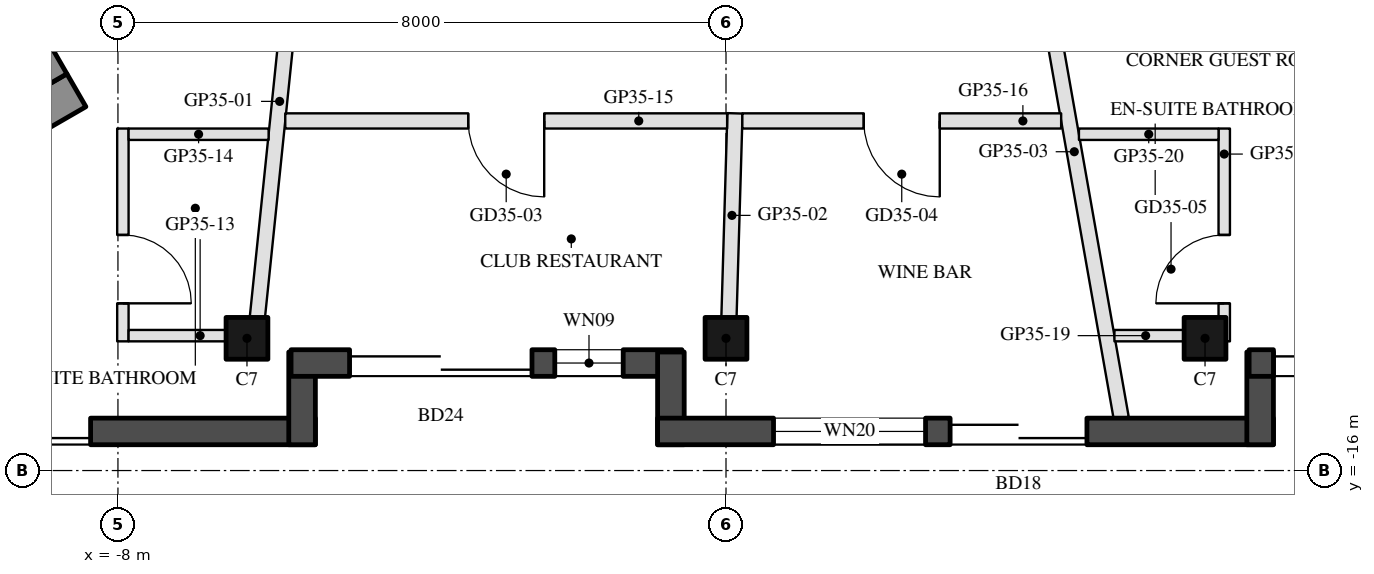
"""IFC4 building model, lengths in metres.
Left out: names, types, materials, properties, quantities, classifications, styles, units other than length and angle.
Written with IfcOpenShell. Run it as: python <this file> out.ifc"""

import sys

from ifc_helpers import new_model, si_unit, direction, frame, frame_2d, origin, origin_2d, place, context, subcontext, project, spatial, rectangle, hollow_rectangle, extrude, boolean, halfspace, element, fill, save


model = new_model("IFC4")
c1 = context("Model", 3, precision=1e-05, world=origin(), true_north=direction((0.0, 1.0)))
c2 = subcontext(c1, "Body", "Model", "MODEL_VIEW")
j1 = project(units=[si_unit("LENGTHUNIT", "METRE"), si_unit("PLANEANGLEUNIT", "RADIAN")], contexts=[c1])
p1 = place(None, origin())
s1 = spatial("IfcSite", under=j1, at=p1, CompositionType="ELEMENT")
p2 = place(p1, origin())
s2 = spatial("IfcBuilding", under=s1, at=p2, CompositionType="ELEMENT")
p3 = place(p2, frame((0.0, 0.0, 324.4)))
s3 = spatial("IfcBuildingStorey", under=s2, at=p3, CompositionType="ELEMENT", Elevation=324.4)
p4 = place(p3, frame((-6.302, -14.26, 0.0), z_axis=(0.0, 0.0, 1.0), x_axis=(-1.0, 0.0, 0.0)))
e1 = element("IfcColumn", 1, at=p4, inside=s3, PredefinedType="COLUMN", context=c2, shape_type="SweptSolid", body=[
    boolean("DIFFERENCE", boolean("DIFFERENCE", extrude(hollow_rectangle(XDim=0.55, YDim=0.55, WallThickness=0.025, at=origin_2d()), origin(), (0.0, 0.0, 1.0), 3.7), halfspace(frame((0.0, 0.0, 0.034), z_axis=(0.0, 0.0, 1.0), x_axis=(1.0, 0.0, 0.0)), True)), halfspace(frame((0.0, 0.0, 3.666), z_axis=(0.0, 0.0, 1.0), x_axis=(1.0, 0.0, 0.0)), False)),
])
p5 = place(p3, frame((0.0, -14.26, 0.0), z_axis=(0.0, 0.0, 1.0), x_axis=(-1.0, 0.0, 0.0)))
e2 = element("IfcColumn", 2, at=p5, inside=s3, PredefinedType="COLUMN", context=c2, shape_type="SweptSolid", body=[
    boolean("DIFFERENCE", boolean("DIFFERENCE", extrude(hollow_rectangle(XDim=0.55, YDim=0.55, WallThickness=0.025, at=origin_2d()), origin(), (0.0, 0.0, 1.0), 3.7), halfspace(frame((0.0, 0.0, 0.031), z_axis=(0.0, 0.0, 1.0), x_axis=(1.0, 0.0, 0.0)), True)), halfspace(frame((0.0, 0.0, 3.669), z_axis=(0.0, 0.0, 1.0), x_axis=(1.0, 0.0, 0.0)), False)),
])
p6 = place(p3, frame((6.302, -14.26, 0.0), z_axis=(0.0, 0.0, 1.0), x_axis=(-1.0, 0.0, 0.0)))
e3 = element("IfcColumn", 3, at=p6, inside=s3, PredefinedType="COLUMN", context=c2, shape_type="SweptSolid", body=[
    boolean("DIFFERENCE", boolean("DIFFERENCE", extrude(hollow_rectangle(XDim=0.55, YDim=0.55, WallThickness=0.025, at=origin_2d()), origin(), (0.0, 0.0, 1.0), 3.7), halfspace(frame((0.0, 0.0, 0.034), z_axis=(0.0, 0.0, 1.0), x_axis=(1.0, 0.0, 0.0)), True)), halfspace(frame((0.0, 0.0, 3.666), z_axis=(0.0, 0.0, 1.0), x_axis=(1.0, 0.0, 0.0)), False)),
])
p7 = place(p3, frame((-15.011, -15.485, 0.0), z_axis=(0.0, 0.0, 1.0), x_axis=(1.0, 0.0, 0.0)))
e4 = element("IfcWall", 4, at=p7, inside=s3, PredefinedType="SOLIDWALL", context=c2, shape_type="SweptSolid", body=[
    extrude(rectangle(XDim=9.608, YDim=0.35, at=frame_2d((4.804, 0.0))), origin(), (0.0, 0.0, 1.0), 3.55),
])
p8 = place(p7, frame((0.38, 0.0, 0.3)))
e5 = element("IfcOpeningElement", 5, at=p8, cuts=e4, PredefinedType="OPENING", context=c2, shape_type="SweptSolid", body=[
    extrude(rectangle(XDim=1.4, YDim=2.65, at=frame_2d((0.7, 1.325))), frame((0.0, 0.185, 0.0), z_axis=(0.0, -1.0, 0.0), x_axis=(1.0, 0.0, 0.0)), (0.0, 0.0, 1.0), 0.37),
])
p9 = place(p7, frame((4.251, 0.0, 0.0)))
e6 = element("IfcOpeningElement", 6, at=p9, cuts=e4, PredefinedType="OPENING", context=c2, shape_type="SweptSolid", body=[
    extrude(rectangle(XDim=2.4, YDim=2.4, at=frame_2d((1.2, 1.2))), frame((0.0, 0.185, 0.0), z_axis=(0.0, -1.0, 0.0), x_axis=(1.0, 0.0, 0.0)), (0.0, 0.0, 1.0), 0.37),
])
p10 = place(p7, frame((3.031, 0.0, 0.3)))
e7 = element("IfcOpeningElement", 7, at=p10, cuts=e4, PredefinedType="OPENING", context=c2, shape_type="SweptSolid", body=[
    extrude(rectangle(XDim=0.9, YDim=2.65, at=frame_2d((0.45, 1.325))), frame((0.0, 0.185, 0.0), z_axis=(0.0, -1.0, 0.0), x_axis=(1.0, 0.0, 0.0)), (0.0, 0.0, 1.0), 0.37),
])
p11 = place(p3, frame((-5.577, -15.66, 0.0), z_axis=(0.0, 0.0, 1.0), x_axis=(0.0, 1.0, 0.0)))
e8 = element("IfcWall", 8, at=p11, inside=s3, PredefinedType="SOLIDWALL", context=c2, shape_type="SweptSolid", body=[
    extrude(rectangle(XDim=1.22, YDim=0.35, at=frame_2d((0.61, 0.0))), origin(), (0.0, 0.0, 1.0), 3.55),
])
p12 = place(p3, frame((-5.722, -14.585, 0.0), z_axis=(0.0, 0.0, 1.0), x_axis=(1.0, 0.0, 0.0)))
e9 = element("IfcWall", 9, at=p12, inside=s3, PredefinedType="SOLIDWALL", context=c2, shape_type="SweptSolid", body=[
    extrude(rectangle(XDim=5.142, YDim=0.35, at=frame_2d((2.571, 0.0))), origin(), (0.0, 0.0, 1.0), 3.55),
])
p13 = place(p12, frame((0.77, 0.0, 0.0)))
e10 = element("IfcOpeningElement", 10, at=p13, cuts=e9, PredefinedType="OPENING", context=c2, shape_type="SweptSolid", body=[
    extrude(rectangle(XDim=2.4, YDim=2.4, at=frame_2d((1.2, 1.2))), frame((0.0, 0.185, 0.0), z_axis=(0.0, -1.0, 0.0), x_axis=(1.0, 0.0, 0.0)), (0.0, 0.0, 1.0), 0.37),
])
p14 = place(p12, frame((3.47, 0.0, 0.3)))
e11 = element("IfcOpeningElement", 11, at=p14, cuts=e9, PredefinedType="OPENING", context=c2, shape_type="SweptSolid", body=[
    extrude(rectangle(XDim=0.9, YDim=2.65, at=frame_2d((0.45, 1.325))), frame((0.0, 0.185, 0.0), z_axis=(0.0, -1.0, 0.0), x_axis=(1.0, 0.0, 0.0)), (0.0, 0.0, 1.0), 0.37),
])
p15 = place(p3, frame((-0.725, -14.44, 0.0), z_axis=(0.0, 0.0, 1.0), x_axis=(0.0, -1.0, 0.0)))
e12 = element("IfcWall", 12, at=p15, inside=s3, PredefinedType="SOLIDWALL", context=c2, shape_type="SweptSolid", body=[
    extrude(rectangle(XDim=1.22, YDim=0.35, at=frame_2d((0.61, 0.0))), origin(), (0.0, 0.0, 1.0), 3.55),
])
p16 = place(p3, frame((-0.9, -15.485, 0.0), z_axis=(0.0, 0.0, 1.0), x_axis=(1.0, 0.0, 0.0)))
e13 = element("IfcWall", 13, at=p16, inside=s3, PredefinedType="SOLIDWALL", context=c2, shape_type="SweptSolid", body=[
    extrude(rectangle(XDim=8.102, YDim=0.35, at=frame_2d((4.051, 0.0))), origin(), (0.0, 0.0, 1.0), 3.55),
])
p17 = place(p16, frame((3.849, 0.0, 0.0)))
e14 = element("IfcOpeningElement", 14, at=p17, cuts=e13, PredefinedType="OPENING", context=c2, shape_type="SweptSolid", body=[
    extrude(rectangle(XDim=1.8, YDim=2.4, at=frame_2d((0.9, 1.2))), frame((0.0, 0.185, 0.0), z_axis=(0.0, -1.0, 0.0), x_axis=(1.0, 0.0, 0.0)), (0.0, 0.0, 1.0), 0.37),
])
p18 = place(p16, frame((1.525, 0.0, 0.3)))
e15 = element("IfcOpeningElement", 15, at=p18, cuts=e13, PredefinedType="OPENING", context=c2, shape_type="SweptSolid", body=[
    extrude(rectangle(XDim=2.0, YDim=2.65, at=frame_2d((1.0, 1.325))), frame((0.0, 0.185, 0.0), z_axis=(0.0, -1.0, 0.0), x_axis=(1.0, 0.0, 0.0)), (0.0, 0.0, 1.0), 0.37),
])
p19 = place(p3, frame((7.027, -15.66, 0.0), z_axis=(0.0, 0.0, 1.0), x_axis=(0.0, 1.0, 0.0)))
e16 = element("IfcWall", 16, at=p19, inside=s3, PredefinedType="SOLIDWALL", context=c2, shape_type="SweptSolid", body=[
    extrude(rectangle(XDim=1.22, YDim=0.35, at=frame_2d((0.61, 0.0))), origin(), (0.0, 0.0, 1.0), 3.55),
])
p20 = place(p3, frame((6.882, -14.585, 0.0), z_axis=(0.0, 0.0, 1.0), x_axis=(1.0, 0.0, 0.0)))
e17 = element("IfcWall", 17, at=p20, inside=s3, PredefinedType="SOLIDWALL", context=c2, shape_type="SweptSolid", body=[
    extrude(rectangle(XDim=5.143, YDim=0.35, at=frame_2d((2.571, 0.0))), origin(), (0.0, 0.0, 1.0), 3.55),
])
p21 = place(p20, frame((0.32, 0.0, 0.0)))
e18 = element("IfcOpeningElement", 18, at=p21, cuts=e17, PredefinedType="OPENING", context=c2, shape_type="SweptSolid", body=[
    extrude(rectangle(XDim=2.4, YDim=2.4, at=frame_2d((1.2, 1.2))), frame((0.0, 0.185, 0.0), z_axis=(0.0, -1.0, 0.0), x_axis=(1.0, 0.0, 0.0)), (0.0, 0.0, 1.0), 0.37),
])
p22 = place(p20, frame((3.02, 0.0, 0.3)))
e19 = element("IfcOpeningElement", 19, at=p22, cuts=e17, PredefinedType="OPENING", context=c2, shape_type="SweptSolid", body=[
    extrude(rectangle(XDim=1.8, YDim=2.65, at=frame_2d((0.9, 1.325))), frame((0.0, 0.185, 0.0), z_axis=(0.0, -1.0, 0.0), x_axis=(1.0, 0.0, 0.0)), (0.0, 0.0, 1.0), 0.37),
])
p23 = place(p3, frame((-8.547, -10.997, 0.0), z_axis=(0.0, 0.0, 1.0), x_axis=(-0.866030186143, -0.49999171662, 0.0)))
e20 = element("IfcWall", 20, at=p23, inside=s3, PredefinedType="SHEAR", context=c2, shape_type="SweptSolid", body=[
    extrude(rectangle(XDim=8.267, YDim=0.5, at=frame_2d((4.134, 0.0))), origin(), (0.0, 0.0, 1.0), 3.5),
])
p24 = place(p3, frame((-13.845, -2.22, 0.0), z_axis=(0.0, 0.0, 1.0), x_axis=(0.500004234368, -0.866022959057, 0.0)))
e21 = element("IfcWall", 21, at=p24, inside=s3, PredefinedType="SHEAR", context=c2, shape_type="SweptSolid", body=[
    extrude(rectangle(XDim=10.0, YDim=0.4, at=frame_2d((5.0, 0.0))), origin(), (0.0, 0.0, 1.0), 3.5),
])
p25 = place(p24, frame((3.55, 0.0, 0.0)))
e22 = element("IfcOpeningElement", 22, at=p25, cuts=e21, PredefinedType="OPENING", context=c2, shape_type="SweptSolid", body=[
    extrude(rectangle(XDim=1.1, YDim=2.1, at=frame_2d((0.55, 1.05))), frame((0.0, 0.21, 0.0), z_axis=(0.0, -1.0, 0.0), x_axis=(1.0, 0.0, 0.0)), (0.0, 0.0, 1.0), 0.42),
])
p26 = place(p24, frame((5.85, 0.0, 0.0)))
e23 = element("IfcOpeningElement", 23, at=p26, cuts=e21, PredefinedType="OPENING", context=c2, shape_type="SweptSolid", body=[
    extrude(rectangle(XDim=1.4, YDim=2.1, at=frame_2d((0.7, 1.05))), frame((0.0, 0.21, 0.0), z_axis=(0.0, -1.0, 0.0), x_axis=(1.0, 0.0, 0.0)), (0.0, 0.0, 1.0), 0.42),
])
p27 = place(p3, frame((-6.166, -13.985, 0.0), z_axis=(0.0, 0.0, 1.0), x_axis=(0.102603302072, 0.994722354431, 0.0)))
e24 = element("IfcWall", 24, at=p27, inside=s3, PredefinedType="PARTITIONING", context=c2, shape_type="SweptSolid", body=[
    extrude(rectangle(XDim=5.716, YDim=0.2, at=frame_2d((2.858, 0.0))), origin(), (0.0, 0.0, 1.0), 3.1),
])
p28 = place(p3, frame((0.039, -13.985, 0.0), z_axis=(0.0, 0.0, 1.0), x_axis=(0.029444451266, 0.999566418148, 0.0)))
e25 = element("IfcWall", 25, at=p28, inside=s3, PredefinedType="PARTITIONING", context=c2, shape_type="SweptSolid", body=[
    extrude(rectangle(XDim=2.687, YDim=0.2, at=frame_2d((1.343, 0.0))), origin(), (0.0, 0.0, 1.0), 3.15),
])
p29 = place(p3, frame((5.2, -15.31, 0.0), z_axis=(0.0, 0.0, 1.0), x_axis=(-0.173513360602, 0.984831515384, 0.0)))
e26 = element("IfcWall", 26, at=p29, inside=s3, PredefinedType="PARTITIONING", context=c2, shape_type="SweptSolid", body=[
    extrude(rectangle(XDim=7.118, YDim=0.2, at=frame_2d((3.559, 0.0))), origin(), (0.0, 0.0, 1.0), 3.1),
])
p30 = place(p3, frame((-7.935, -11.5, 0.0), z_axis=(0.0, 0.0, 1.0), x_axis=(0.0, -1.0, 0.0)))
e27 = element("IfcWall", 27, at=p30, inside=s3, PredefinedType="PARTITIONING", context=c2, shape_type="SweptSolid", body=[
    extrude(rectangle(XDim=2.8, YDim=0.15, at=frame_2d((1.4, 0.0))), origin(), (0.0, 0.0, 1.0), 3.1),
])
p31 = place(p30, frame((1.4, 0.0, 0.0)))
e28 = element("IfcOpeningElement", 28, at=p31, cuts=e27, PredefinedType="OPENING", context=c2, shape_type="SweptSolid", body=[
    extrude(rectangle(XDim=0.9, YDim=2.1, at=frame_2d((0.45, 1.05))), frame((0.0, 0.085, 0.0), z_axis=(0.0, -1.0, 0.0), x_axis=(1.0, 0.0, 0.0)), (0.0, 0.0, 1.0), 0.17),
])
p32 = place(p3, frame((-7.86, -14.225, 0.0), z_axis=(0.0, 0.0, 1.0), x_axis=(1.0, 0.0, 0.0)))
e29 = element("IfcWall", 29, at=p32, inside=s3, PredefinedType="PARTITIONING", context=c2, shape_type="SweptSolid", body=[
    extrude(rectangle(XDim=1.569, YDim=0.15, at=frame_2d((0.785, 0.0))), origin(), (0.0, 0.0, 1.0), 3.1),
])
p33 = place(p3, frame((-7.86, -11.575, 0.0), z_axis=(0.0, 0.0, 1.0), x_axis=(1.0, 0.0, 0.0)))
e30 = element("IfcWall", 30, at=p33, inside=s3, PredefinedType="PARTITIONING", context=c2, shape_type="SweptSolid", body=[
    extrude(rectangle(XDim=1.843, YDim=0.15, at=frame_2d((0.921, 0.0))), origin(), (0.0, 0.0, 1.0), 3.15),
])
p34 = place(p3, frame((0.015, -11.4, 0.0), z_axis=(0.0, 0.0, 1.0), x_axis=(-1.0, 0.0, 0.0)))
e31 = element("IfcWall", 31, at=p34, inside=s3, PredefinedType="PARTITIONING", context=c2, shape_type="SweptSolid", body=[
    extrude(rectangle(XDim=5.813, YDim=0.2, at=frame_2d((2.907, 0.0))), origin(), (0.0, 0.0, 1.0), 3.15),
])
p35 = place(p34, frame((2.407, 0.0, 0.0)))
e32 = element("IfcOpeningElement", 32, at=p35, cuts=e31, PredefinedType="OPENING", context=c2, shape_type="SweptSolid", body=[
    extrude(rectangle(XDim=1.0, YDim=2.1, at=frame_2d((0.5, 1.05))), frame((0.0, 0.11, 0.0), z_axis=(0.0, -1.0, 0.0), x_axis=(1.0, 0.0, 0.0)), (0.0, 0.0, 1.0), 0.22),
])
p36 = place(p3, frame((4.409, -11.4, 0.0), z_axis=(0.0, 0.0, 1.0), x_axis=(-1.0, 0.0, 0.0)))
e33 = element("IfcWall", 33, at=p36, inside=s3, PredefinedType="PARTITIONING", context=c2, shape_type="SweptSolid", body=[
    extrude(rectangle(XDim=4.195, YDim=0.2, at=frame_2d((2.097, 0.0))), origin(), (0.0, 0.0, 1.0), 3.15),
])
p37 = place(p36, frame((1.597, 0.0, 0.0)))
e34 = element("IfcOpeningElement", 34, at=p37, cuts=e33, PredefinedType="OPENING", context=c2, shape_type="SweptSolid", body=[
    extrude(rectangle(XDim=1.0, YDim=2.1, at=frame_2d((0.5, 1.05))), frame((0.0, 0.11, 0.0), z_axis=(0.0, -1.0, 0.0), x_axis=(1.0, 0.0, 0.0)), (0.0, 0.0, 1.0), 0.22),
])
p38 = place(p3, frame((6.555, -14.3, 0.0), z_axis=(0.0, 0.0, 1.0), x_axis=(0.0, 1.0, 0.0)))
e35 = element("IfcWall", 35, at=p38, inside=s3, PredefinedType="PARTITIONING", context=c2, shape_type="SweptSolid", body=[
    extrude(rectangle(XDim=2.8, YDim=0.15, at=frame_2d((1.4, 0.0))), origin(), (0.0, 0.0, 1.0), 3.1),
])
p39 = place(p38, frame((0.5, 0.0, 0.0)))
e36 = element("IfcOpeningElement", 36, at=p39, cuts=e35, PredefinedType="OPENING", context=c2, shape_type="SweptSolid", body=[
    extrude(rectangle(XDim=0.9, YDim=2.1, at=frame_2d((0.45, 1.05))), frame((0.0, 0.085, 0.0), z_axis=(0.0, -1.0, 0.0), x_axis=(1.0, 0.0, 0.0)), (0.0, 0.0, 1.0), 0.17),
])
p40 = place(p3, frame((5.11, -14.225, 0.0), z_axis=(0.0, 0.0, 1.0), x_axis=(1.0, 0.0, 0.0)))
e37 = element("IfcWall", 37, at=p40, inside=s3, PredefinedType="PARTITIONING", context=c2, shape_type="SweptSolid", body=[
    extrude(rectangle(XDim=1.37, YDim=0.15, at=frame_2d((0.685, 0.0))), origin(), (0.0, 0.0, 1.0), 3.1),
])
p41 = place(p3, frame((4.643, -11.575, 0.0), z_axis=(0.0, 0.0, 1.0), x_axis=(1.0, 0.0, 0.0)))
e38 = element("IfcWall", 38, at=p41, inside=s3, PredefinedType="PARTITIONING", context=c2, shape_type="SweptSolid", body=[
    extrude(rectangle(XDim=1.837, YDim=0.15, at=frame_2d((0.918, 0.0))), origin(), (0.0, 0.0, 1.0), 3.15),
])
p42 = place(p9, frame((2.4, 0.0, 0.0), z_axis=(0.0, 0.0, 1.0), x_axis=(-1.0, 0.0, 0.0)))
e39 = element("IfcDoor", 39, at=p42, inside=s3, OperationType="SLIDING_TO_LEFT", PredefinedType="DOOR", context=c2, shape_type="SweptSolid", body=[
    extrude(rectangle(XDim=2.4, YDim=2.4, at=frame_2d((1.2, 1.2))), frame((0.0, 0.025, 0.0), z_axis=(0.0, -1.0, 0.0), x_axis=(1.0, 0.0, 0.0)), (0.0, 0.0, 1.0), 0.05),
])
fill(e6, e39)
p43 = place(p13, frame((2.4, 0.0, 0.0), z_axis=(0.0, 0.0, 1.0), x_axis=(-1.0, 0.0, 0.0)))
e40 = element("IfcDoor", 40, at=p43, inside=s3, OperationType="SLIDING_TO_LEFT", PredefinedType="DOOR", context=c2, shape_type="SweptSolid", body=[
    extrude(rectangle(XDim=2.4, YDim=2.4, at=frame_2d((1.2, 1.2))), frame((0.0, 0.025, 0.0), z_axis=(0.0, -1.0, 0.0), x_axis=(1.0, 0.0, 0.0)), (0.0, 0.0, 1.0), 0.05),
])
fill(e10, e40)
p44 = place(p14, origin())
e41 = element("IfcWindow", 41, at=p44, inside=s3, PartitioningType="SINGLE_PANEL", PredefinedType="WINDOW", context=c2, shape_type="SweptSolid", body=[
    extrude(rectangle(XDim=0.9, YDim=2.65, at=frame_2d((0.45, 1.325))), frame((0.0, 0.03, 0.0), z_axis=(0.0, -1.0, 0.0), x_axis=(1.0, 0.0, 0.0)), (0.0, 0.0, 1.0), 0.06),
])
fill(e11, e41)
p45 = place(p17, frame((1.8, 0.0, 0.0), z_axis=(0.0, 0.0, 1.0), x_axis=(-1.0, 0.0, 0.0)))
e42 = element("IfcDoor", 42, at=p45, inside=s3, OperationType="SLIDING_TO_LEFT", PredefinedType="DOOR", context=c2, shape_type="SweptSolid", body=[
    extrude(rectangle(XDim=1.8, YDim=2.4, at=frame_2d((0.9, 1.2))), frame((0.0, 0.025, 0.0), z_axis=(0.0, -1.0, 0.0), x_axis=(1.0, 0.0, 0.0)), (0.0, 0.0, 1.0), 0.05),
])
fill(e14, e42)
p46 = place(p18, origin())
e43 = element("IfcWindow", 43, at=p46, inside=s3, PartitioningType="SINGLE_PANEL", PredefinedType="WINDOW", context=c2, shape_type="SweptSolid", body=[
    extrude(rectangle(XDim=2.0, YDim=2.65, at=frame_2d((1.0, 1.325))), frame((0.0, 0.03, 0.0), z_axis=(0.0, -1.0, 0.0), x_axis=(1.0, 0.0, 0.0)), (0.0, 0.0, 1.0), 0.06),
])
fill(e15, e43)
p47 = place(p21, frame((2.4, 0.0, 0.0), z_axis=(0.0, 0.0, 1.0), x_axis=(-1.0, 0.0, 0.0)))
e44 = element("IfcDoor", 44, at=p47, inside=s3, OperationType="SLIDING_TO_LEFT", PredefinedType="DOOR", context=c2, shape_type="SweptSolid", body=[
    extrude(rectangle(XDim=2.4, YDim=2.4, at=frame_2d((1.2, 1.2))), frame((0.0, 0.025, 0.0), z_axis=(0.0, -1.0, 0.0), x_axis=(1.0, 0.0, 0.0)), (0.0, 0.0, 1.0), 0.05),
])
fill(e18, e44)
p48 = place(p31, origin())
e45 = element("IfcDoor", 45, at=p48, inside=s3, OperationType="SINGLE_SWING_RIGHT", PredefinedType="DOOR", context=c2, shape_type="SweptSolid", body=[
    extrude(rectangle(XDim=0.9, YDim=2.1, at=frame_2d((0.45, 1.05))), frame((0.0, 0.025, 0.0), z_axis=(0.0, -1.0, 0.0), x_axis=(1.0, 0.0, 0.0)), (0.0, 0.0, 1.0), 0.05),
])
fill(e28, e45)
p49 = place(p35, origin())
e46 = element("IfcDoor", 46, at=p49, inside=s3, OperationType="SINGLE_SWING_LEFT", PredefinedType="DOOR", context=c2, shape_type="SweptSolid", body=[
    extrude(rectangle(XDim=1.0, YDim=2.1, at=frame_2d((0.5, 1.05))), frame((0.0, 0.025, 0.0), z_axis=(0.0, -1.0, 0.0), x_axis=(1.0, 0.0, 0.0)), (0.0, 0.0, 1.0), 0.05),
])
fill(e32, e46)
p50 = place(p37, origin())
e47 = element("IfcDoor", 47, at=p50, inside=s3, OperationType="SINGLE_SWING_LEFT", PredefinedType="DOOR", context=c2, shape_type="SweptSolid", body=[
    extrude(rectangle(XDim=1.0, YDim=2.1, at=frame_2d((0.5, 1.05))), frame((0.0, 0.025, 0.0), z_axis=(0.0, -1.0, 0.0), x_axis=(1.0, 0.0, 0.0)), (0.0, 0.0, 1.0), 0.05),
])
fill(e34, e47)
p51 = place(p39, origin())
e48 = element("IfcDoor", 48, at=p51, inside=s3, OperationType="SINGLE_SWING_LEFT", PredefinedType="DOOR", context=c2, shape_type="SweptSolid", body=[
    extrude(rectangle(XDim=0.9, YDim=2.1, at=frame_2d((0.45, 1.05))), frame((0.0, 0.025, 0.0), z_axis=(0.0, -1.0, 0.0), x_axis=(1.0, 0.0, 0.0)), (0.0, 0.0, 1.0), 0.05),
])
fill(e36, e48)
save(model, sys.argv[1])
